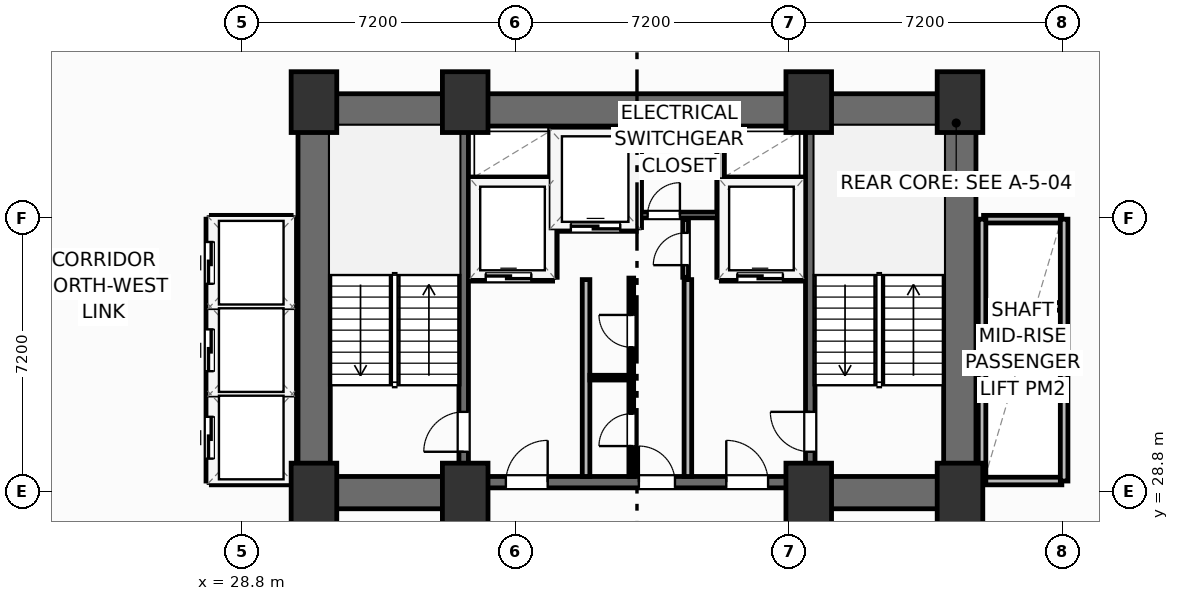
"""IFC4 building model, lengths in metres.
Left out: names, types, materials, properties, quantities, classifications, styles, units other than length and angle.
Written with IfcOpenShell. Run it as: python <this file> out.ifc"""

import sys

from ifc_helpers import new_model, si_unit, direction, frame, frame_2d, origin, origin_2d, place, context, subcontext, project, spatial, rectangle, extrude, element, fill, save


model = new_model("IFC4")
c1 = context("Model", 3, precision=1e-05, world=origin(), true_north=direction((0.0, 1.0)))
c2 = subcontext(c1, "Body", "Model", "MODEL_VIEW")
j1 = project(units=[si_unit("LENGTHUNIT", "METRE"), si_unit("PLANEANGLEUNIT", "RADIAN")], contexts=[c1])
p1 = place(None, origin())
s1 = spatial("IfcSite", under=j1, at=p1, CompositionType="ELEMENT")
p2 = place(p1, origin())
s2 = spatial("IfcBuilding", under=s1, at=p2, CompositionType="ELEMENT")
p3 = place(p2, frame((0.0, 0.0, 34.4)))
s3 = spatial("IfcBuildingStorey", under=s2, at=p3, CompositionType="ELEMENT", Elevation=34.4)
for number, where, z_axis, x_axis in (
    (1, (30.7, 28.75, 0.0), (0.0, 0.0, 1.0), (1.0, 0.0, 0.0)),
    (2, (34.68, 28.75, 0.0), (0.0, 0.0, 1.0), (1.0, 0.0, 0.0)),
    (3, (43.72, 28.75, 0.0), (0.0, 0.0, 1.0), (1.0, 0.0, 0.0)),
    (4, (47.7, 28.75, 0.0), (0.0, 0.0, 1.0), (1.0, 0.0, 0.0)),
    (5, (30.7, 39.05, 0.0), (0.0, 0.0, 1.0), (1.0, 0.0, 0.0)),
    (6, (34.68, 39.05, 0.0), (0.0, 0.0, 1.0), (1.0, 0.0, 0.0)),
    (7, (43.72, 39.05, 0.0), (0.0, 0.0, 1.0), (1.0, 0.0, 0.0)),
    (8, (47.7, 39.05, 0.0), (0.0, 0.0, 1.0), (1.0, 0.0, 0.0)),
):
    element("IfcColumn", number, at=place(p3, frame(where, z_axis=z_axis, x_axis=x_axis)), inside=s3, PredefinedType="COLUMN", context=c2, shape_type="SweptSolid", body=[
        extrude(rectangle(XDim=1.2, YDim=1.6, at=origin_2d()), origin(), (0.0, 0.0, 1.0), 3.7),
    ])
p4 = place(p3, frame((30.28, 38.845, 0.0), z_axis=(0.0, 0.0, 1.0), x_axis=(1.0, 0.0, 0.0)))
e9 = element("IfcWall", 9, at=p4, inside=s3, PredefinedType="SHEAR", context=c2, shape_type="SweptSolid", body=[
    extrude(rectangle(XDim=17.84, YDim=0.85, at=frame_2d((8.92, 0.0))), origin(), (0.0, 0.0, 1.0), 3.45),
])
for number, where, z_axis, x_axis in (
    (10, (30.705, 29.2, 0.0), (0.0, 0.0, 1.0), (0.0, 1.0, 0.0)),
    (11, (47.695, 29.2, 0.0), (0.0, 0.0, 1.0), (0.0, 1.0, 0.0)),
):
    element("IfcWall", number, at=place(p3, frame(where, z_axis=z_axis, x_axis=x_axis)), inside=s3, PredefinedType="SHEAR", context=c2, shape_type="SweptSolid", body=[
        extrude(rectangle(XDim=9.22, YDim=0.85, at=frame_2d((4.61, 0.0))), origin(), (0.0, 0.0, 1.0), 3.45),
    ])
for number, where, z_axis, x_axis in (
    (12, (30.28, 28.775, 0.0), (0.0, 0.0, 1.0), (1.0, 0.0, 0.0)),
    (13, (43.6, 28.775, 0.0), (0.0, 0.0, 1.0), (1.0, 0.0, 0.0)),
):
    element("IfcWall", number, at=place(p3, frame(where, z_axis=z_axis, x_axis=x_axis)), inside=s3, PredefinedType="SHEAR", context=c2, shape_type="SweptSolid", body=[
        extrude(rectangle(XDim=4.52, YDim=0.85, at=frame_2d((2.26, 0.0))), origin(), (0.0, 0.0, 1.0), 3.45),
    ])
p5 = place(p3, frame((34.8, 29.05, 0.0), z_axis=(0.0, 0.0, 1.0), x_axis=(1.0, 0.0, 0.0)))
e14 = element("IfcWall", 14, at=p5, inside=s3, PredefinedType="SHEAR", context=c2, shape_type="SweptSolid", body=[
    extrude(rectangle(XDim=8.8, YDim=0.3, at=frame_2d((4.4, 0.0))), origin(), (0.0, 0.0, 1.0), 3.45),
])
p6 = place(p5, frame((0.95, 0.0, 0.0)))
e15 = element("IfcOpeningElement", 15, at=p6, cuts=e14, PredefinedType="OPENING", context=c2, shape_type="SweptSolid", body=[
    extrude(rectangle(XDim=1.1, YDim=2.15, at=frame_2d((0.55, 1.075))), frame((0.0, 0.16, 0.0), z_axis=(0.0, -1.0, 0.0), x_axis=(1.0, 0.0, 0.0)), (0.0, 0.0, 1.0), 0.32),
])
p7 = place(p5, frame((6.75, 0.0, 0.0)))
e16 = element("IfcOpeningElement", 16, at=p7, cuts=e14, PredefinedType="OPENING", context=c2, shape_type="SweptSolid", body=[
    extrude(rectangle(XDim=1.1, YDim=2.15, at=frame_2d((0.55, 1.075))), frame((0.0, 0.16, 0.0), z_axis=(0.0, -1.0, 0.0), x_axis=(1.0, 0.0, 0.0)), (0.0, 0.0, 1.0), 0.32),
])
p8 = place(p5, frame((4.45, 0.0, 0.0)))
e17 = element("IfcOpeningElement", 17, at=p8, cuts=e14, PredefinedType="OPENING", context=c2, shape_type="SweptSolid", body=[
    extrude(rectangle(XDim=0.95, YDim=2.15, at=frame_2d((0.475, 1.075))), frame((0.0, 0.16, 0.0), z_axis=(0.0, -1.0, 0.0), x_axis=(1.0, 0.0, 0.0)), (0.0, 0.0, 1.0), 0.32),
])
p9 = place(p3, frame((34.64, 29.2, 0.0), z_axis=(0.0, 0.0, 1.0), x_axis=(0.0, 1.0, 0.0)))
e18 = element("IfcWall", 18, at=p9, inside=s3, PredefinedType="SHEAR", context=c2, shape_type="SweptSolid", body=[
    extrude(rectangle(XDim=9.22, YDim=0.25, at=frame_2d((4.61, 0.0))), origin(), (0.0, 0.0, 1.0), 3.45),
])
p10 = place(p9, frame((0.65, 0.0, 0.0)))
e19 = element("IfcOpeningElement", 19, at=p10, cuts=e18, PredefinedType="OPENING", context=c2, shape_type="SweptSolid", body=[
    extrude(rectangle(XDim=1.05, YDim=2.15, at=frame_2d((0.525, 1.075))), frame((0.0, 0.135, 0.0), z_axis=(0.0, -1.0, 0.0), x_axis=(1.0, 0.0, 0.0)), (0.0, 0.0, 1.0), 0.27),
])
p11 = place(p3, frame((43.76, 29.2, 0.0), z_axis=(0.0, 0.0, 1.0), x_axis=(0.0, 1.0, 0.0)))
e20 = element("IfcWall", 20, at=p11, inside=s3, PredefinedType="SHEAR", context=c2, shape_type="SweptSolid", body=[
    extrude(rectangle(XDim=9.22, YDim=0.25, at=frame_2d((4.61, 0.0))), origin(), (0.0, 0.0, 1.0), 3.45),
])
p12 = place(p11, frame((0.65, 0.0, 0.0)))
e21 = element("IfcOpeningElement", 21, at=p12, cuts=e20, PredefinedType="OPENING", context=c2, shape_type="SweptSolid", body=[
    extrude(rectangle(XDim=1.05, YDim=2.15, at=frame_2d((0.525, 1.075))), frame((0.0, 0.135, 0.0), z_axis=(0.0, -1.0, 0.0), x_axis=(1.0, 0.0, 0.0)), (0.0, 0.0, 1.0), 0.27),
])
for number, where, z_axis, x_axis in (
    (22, (37.86, 29.2, 0.0), (0.0, 0.0, 1.0), (0.0, 1.0, 0.0)),
    (23, (40.54, 29.2, 0.0), (0.0, 0.0, 1.0), (0.0, 1.0, 0.0)),
):
    element("IfcWall", number, at=place(p3, frame(where, z_axis=z_axis, x_axis=x_axis)), inside=s3, PredefinedType="PARTITIONING", context=c2, shape_type="SweptSolid", body=[
        extrude(rectangle(XDim=5.18, YDim=0.2, at=frame_2d((2.59, 0.0))), origin(), (0.0, 0.0, 1.0), 3.45),
    ])
p13 = place(p3, frame((34.8, 34.44, 0.0), z_axis=(0.0, 0.0, 1.0), x_axis=(1.0, 0.0, 0.0)))
e24 = element("IfcWall", 24, at=p13, inside=s3, PredefinedType="PARTITIONING", context=c2, shape_type="SweptSolid", body=[
    extrude(rectangle(XDim=2.18, YDim=0.2, at=frame_2d((1.09, 0.0))), origin(), (0.0, 0.0, 1.0), 3.45),
])
p14 = place(p13, frame((0.42, 0.0, 0.0)))
e25 = element("IfcOpeningElement", 25, at=p14, cuts=e24, PredefinedType="OPENING", context=c2, shape_type="SweptSolid", body=[
    extrude(rectangle(XDim=1.2, YDim=2.2, at=frame_2d((0.6, 1.1))), frame((0.0, 0.11, 0.0), z_axis=(0.0, -1.0, 0.0), x_axis=(1.0, 0.0, 0.0)), (0.0, 0.0, 1.0), 0.22),
])
p15 = place(p3, frame((34.8, 36.98, 0.0), z_axis=(0.0, 0.0, 1.0), x_axis=(1.0, 0.0, 0.0)))
e26 = element("IfcWall", 26, at=p15, inside=s3, PredefinedType="PARTITIONING", context=c2, shape_type="SweptSolid", body=[
    extrude(rectangle(XDim=2.18, YDim=0.2, at=frame_2d((1.09, 0.0))), origin(), (0.0, 0.0, 1.0), 3.45),
])
p16 = place(p3, frame((37.0, 34.44, 0.0), z_axis=(0.0, 0.0, 1.0), x_axis=(0.0, 1.0, 0.0)))
e27 = element("IfcWall", 27, at=p16, inside=s3, PredefinedType="PARTITIONING", context=c2, shape_type="SweptSolid", body=[
    extrude(rectangle(XDim=3.9, YDim=0.2, at=frame_2d((1.95, 0.0))), origin(), (0.0, 0.0, 1.0), 3.45),
])
p17 = place(p3, frame((41.42, 34.44, 0.0), z_axis=(0.0, 0.0, 1.0), x_axis=(1.0, 0.0, 0.0)))
e28 = element("IfcWall", 28, at=p17, inside=s3, PredefinedType="PARTITIONING", context=c2, shape_type="SweptSolid", body=[
    extrude(rectangle(XDim=2.18, YDim=0.2, at=frame_2d((1.09, 0.0))), origin(), (0.0, 0.0, 1.0), 3.45),
])
p18 = place(p17, frame((0.42, 0.0, 0.0)))
e29 = element("IfcOpeningElement", 29, at=p18, cuts=e28, PredefinedType="OPENING", context=c2, shape_type="SweptSolid", body=[
    extrude(rectangle(XDim=1.2, YDim=2.2, at=frame_2d((0.6, 1.1))), frame((0.0, 0.11, 0.0), z_axis=(0.0, -1.0, 0.0), x_axis=(1.0, 0.0, 0.0)), (0.0, 0.0, 1.0), 0.22),
])
p19 = place(p3, frame((41.42, 36.98, 0.0), z_axis=(0.0, 0.0, 1.0), x_axis=(1.0, 0.0, 0.0)))
e30 = element("IfcWall", 30, at=p19, inside=s3, PredefinedType="PARTITIONING", context=c2, shape_type="SweptSolid", body=[
    extrude(rectangle(XDim=2.18, YDim=0.2, at=frame_2d((1.09, 0.0))), origin(), (0.0, 0.0, 1.0), 3.45),
])
p20 = place(p3, frame((41.4, 34.44, 0.0), z_axis=(0.0, 0.0, 1.0), x_axis=(0.0, 1.0, 0.0)))
e31 = element("IfcWall", 31, at=p20, inside=s3, PredefinedType="PARTITIONING", context=c2, shape_type="SweptSolid", body=[
    extrude(rectangle(XDim=3.9, YDim=0.2, at=frame_2d((1.95, 0.0))), origin(), (0.0, 0.0, 1.0), 3.45),
])
p21 = place(p3, frame((37.06, 35.75, 0.0), z_axis=(0.0, 0.0, 1.0), x_axis=(1.0, 0.0, 0.0)))
e32 = element("IfcWall", 32, at=p21, inside=s3, PredefinedType="PARTITIONING", context=c2, shape_type="SweptSolid", body=[
    extrude(rectangle(XDim=2.12, YDim=0.2, at=frame_2d((1.06, 0.0))), origin(), (0.0, 0.0, 1.0), 3.45),
])
p22 = place(p21, frame((0.4, 0.0, 0.0)))
e33 = element("IfcOpeningElement", 33, at=p22, cuts=e32, PredefinedType="OPENING", context=c2, shape_type="SweptSolid", body=[
    extrude(rectangle(XDim=1.3, YDim=2.2, at=frame_2d((0.65, 1.1))), frame((0.0, 0.11, 0.0), z_axis=(0.0, -1.0, 0.0), x_axis=(1.0, 0.0, 0.0)), (0.0, 0.0, 1.0), 0.22),
])
p23 = place(p3, frame((39.22, 35.75, 0.0), z_axis=(0.0, 0.0, 1.0), x_axis=(0.0, 1.0, 0.0)))
e34 = element("IfcWall", 34, at=p23, inside=s3, PredefinedType="PARTITIONING", context=c2, shape_type="SweptSolid", body=[
    extrude(rectangle(XDim=2.59, YDim=0.2, at=frame_2d((1.295, 0.0))), origin(), (0.0, 0.0, 1.0), 3.45),
])
p24 = place(p3, frame((39.3, 36.08, 0.0), z_axis=(0.0, 0.0, 1.0), x_axis=(1.0, 0.0, 0.0)))
e35 = element("IfcWall", 35, at=p24, inside=s3, PredefinedType="PARTITIONING", context=c2, shape_type="SweptSolid", body=[
    extrude(rectangle(XDim=2.02, YDim=0.15, at=frame_2d((1.01, 0.0))), origin(), (0.0, 0.0, 1.0), 3.45),
])
p25 = place(p24, frame((0.18, 0.0, 0.0)))
e36 = element("IfcOpeningElement", 36, at=p25, cuts=e35, PredefinedType="OPENING", context=c2, shape_type="SweptSolid", body=[
    extrude(rectangle(XDim=0.85, YDim=2.05, at=frame_2d((0.425, 1.025))), frame((0.0, 0.085, 0.0), z_axis=(0.0, -1.0, 0.0), x_axis=(1.0, 0.0, 0.0)), (0.0, 0.0, 1.0), 0.17),
])
p26 = place(p3, frame((40.48, 34.44, 0.0), z_axis=(0.0, 0.0, 1.0), x_axis=(0.0, 1.0, 0.0)))
e37 = element("IfcWall", 37, at=p26, inside=s3, PredefinedType="PARTITIONING", context=c2, shape_type="SweptSolid", body=[
    extrude(rectangle(XDim=1.52, YDim=0.15, at=frame_2d((0.76, 0.0))), origin(), (0.0, 0.0, 1.0), 3.45),
])
p27 = place(p26, frame((0.32, 0.0, 0.0)))
e38 = element("IfcOpeningElement", 38, at=p27, cuts=e37, PredefinedType="OPENING", context=c2, shape_type="SweptSolid", body=[
    extrude(rectangle(XDim=0.85, YDim=2.05, at=frame_2d((0.425, 1.025))), frame((0.0, 0.085, 0.0), z_axis=(0.0, -1.0, 0.0), x_axis=(1.0, 0.0, 0.0)), (0.0, 0.0, 1.0), 0.17),
])
p28 = place(p3, frame((37.96, 31.8, 0.0), z_axis=(0.0, 0.0, 1.0), x_axis=(1.0, 0.0, 0.0)))
e39 = element("IfcWall", 39, at=p28, inside=s3, PredefinedType="PARTITIONING", context=c2, shape_type="SweptSolid", body=[
    extrude(rectangle(XDim=1.09, YDim=0.125, at=frame_2d((0.545, 0.0))), origin(), (0.0, 0.0, 1.0), 3.45),
])
p29 = place(p3, frame((39.05, 29.2, 0.0), z_axis=(0.0, 0.0, 1.0), x_axis=(0.0, 1.0, 0.0)))
e40 = element("IfcWall", 40, at=p29, inside=s3, PredefinedType="PARTITIONING", context=c2, shape_type="SweptSolid", body=[
    extrude(rectangle(XDim=5.22, YDim=0.125, at=frame_2d((2.61, 0.0))), origin(), (0.0, 0.0, 1.0), 3.45),
])
p30 = place(p29, frame((0.8, 0.0, 0.0)))
e41 = element("IfcOpeningElement", 41, at=p30, cuts=e40, PredefinedType="OPENING", context=c2, shape_type="SweptSolid", body=[
    extrude(rectangle(XDim=0.85, YDim=2.05, at=frame_2d((0.425, 1.025))), frame((0.0, 0.073, 0.0), z_axis=(0.0, -1.0, 0.0), x_axis=(1.0, 0.0, 0.0)), (0.0, 0.0, 1.0), 0.145),
])
p31 = place(p29, frame((3.4, 0.0, 0.0)))
e42 = element("IfcOpeningElement", 42, at=p31, cuts=e40, PredefinedType="OPENING", context=c2, shape_type="SweptSolid", body=[
    extrude(rectangle(XDim=0.85, YDim=2.05, at=frame_2d((0.425, 1.025))), frame((0.0, 0.073, 0.0), z_axis=(0.0, -1.0, 0.0), x_axis=(1.0, 0.0, 0.0)), (0.0, 0.0, 1.0), 0.145),
])
for number, where, z_axis, x_axis in (
    (43, (28.02, 31.375, 0.0), (0.0, 0.0, 1.0), (1.0, 0.0, 0.0)),
    (44, (28.02, 33.675, 0.0), (0.0, 0.0, 1.0), (1.0, 0.0, 0.0)),
):
    element("IfcWall", number, at=place(p3, frame(where, z_axis=z_axis, x_axis=x_axis)), inside=s3, PredefinedType="PARTITIONING", context=c2, shape_type="SweptSolid", body=[
        extrude(rectangle(XDim=2.06, YDim=0.2, at=frame_2d((1.03, 0.0))), origin(), (0.0, 0.0, 1.0), 3.45),
    ])
for number, where, z_axis, x_axis in (
    (45, (28.0, 29.08, 0.0), (0.0, 0.0, 1.0), (1.0, 0.0, 0.0)),
    (46, (28.0, 35.97, 0.0), (0.0, 0.0, 1.0), (1.0, 0.0, 0.0)),
):
    element("IfcWall", number, at=place(p3, frame(where, z_axis=z_axis, x_axis=x_axis)), inside=s3, PredefinedType="PARTITIONING", context=c2, shape_type="SweptSolid", body=[
        extrude(rectangle(XDim=2.1, YDim=0.2, at=frame_2d((1.05, 0.0))), origin(), (0.0, 0.0, 1.0), 3.45),
    ])
p32 = place(p3, frame((30.12, 29.08, 0.0), z_axis=(0.0, 0.0, 1.0), x_axis=(0.0, 1.0, 0.0)))
e47 = element("IfcWall", 47, at=p32, inside=s3, PredefinedType="PARTITIONING", context=c2, shape_type="SweptSolid", body=[
    extrude(rectangle(XDim=6.89, YDim=0.2, at=frame_2d((3.445, 0.0))), origin(), (0.0, 0.0, 1.0), 3.45),
])
p33 = place(p3, frame((27.96, 29.08, 0.0), z_axis=(0.0, 0.0, 1.0), x_axis=(0.0, 1.0, 0.0)))
e48 = element("IfcWall", 48, at=p33, inside=s3, PredefinedType="PARTITIONING", context=c2, shape_type="SweptSolid", body=[
    extrude(rectangle(XDim=6.89, YDim=0.2, at=frame_2d((3.445, 0.0))), origin(), (0.0, 0.0, 1.0), 3.45),
])
p34 = place(p33, frame((0.59, 0.0, 0.0)))
e49 = element("IfcOpeningElement", 49, at=p34, cuts=e48, PredefinedType="OPENING", context=c2, shape_type="SweptSolid", body=[
    extrude(rectangle(XDim=1.1, YDim=2.15, at=frame_2d((0.55, 1.075))), frame((0.0, 0.11, 0.0), z_axis=(0.0, -1.0, 0.0), x_axis=(1.0, 0.0, 0.0)), (0.0, 0.0, 1.0), 0.22),
])
p35 = place(p33, frame((2.89, 0.0, 0.0)))
e50 = element("IfcOpeningElement", 50, at=p35, cuts=e48, PredefinedType="OPENING", context=c2, shape_type="SweptSolid", body=[
    extrude(rectangle(XDim=1.1, YDim=2.15, at=frame_2d((0.55, 1.075))), frame((0.0, 0.11, 0.0), z_axis=(0.0, -1.0, 0.0), x_axis=(1.0, 0.0, 0.0)), (0.0, 0.0, 1.0), 0.22),
])
p36 = place(p33, frame((5.19, 0.0, 0.0)))
e51 = element("IfcOpeningElement", 51, at=p36, cuts=e48, PredefinedType="OPENING", context=c2, shape_type="SweptSolid", body=[
    extrude(rectangle(XDim=1.1, YDim=2.15, at=frame_2d((0.55, 1.075))), frame((0.0, 0.11, 0.0), z_axis=(0.0, -1.0, 0.0), x_axis=(1.0, 0.0, 0.0)), (0.0, 0.0, 1.0), 0.22),
])
for number, where, z_axis, x_axis in (
    (52, (48.32, 31.375, 0.0), (0.0, 0.0, 1.0), (1.0, 0.0, 0.0)),
    (53, (48.32, 33.675, 0.0), (0.0, 0.0, 1.0), (1.0, 0.0, 0.0)),
):
    element("IfcWall", number, at=place(p3, frame(where, z_axis=z_axis, x_axis=x_axis)), inside=s3, PredefinedType="PARTITIONING", context=c2, shape_type="SweptSolid", body=[
        extrude(rectangle(XDim=2.06, YDim=0.2, at=frame_2d((1.03, 0.0))), origin(), (0.0, 0.0, 1.0), 3.45),
    ])
p37 = place(p3, frame((48.32, 29.08, 0.0), z_axis=(0.0, 0.0, 1.0), x_axis=(1.0, 0.0, 0.0)))
e54 = element("IfcWall", 54, at=p37, inside=s3, PredefinedType="PARTITIONING", context=c2, shape_type="SweptSolid", body=[
    extrude(rectangle(XDim=2.06, YDim=0.2, at=frame_2d((1.03, 0.0))), origin(), (0.0, 0.0, 1.0), 2.662),
])
p38 = place(p3, frame((48.32, 35.97, 0.0), z_axis=(0.0, 0.0, 1.0), x_axis=(1.0, 0.0, 0.0)))
e55 = element("IfcWall", 55, at=p38, inside=s3, PredefinedType="PARTITIONING", context=c2, shape_type="SweptSolid", body=[
    extrude(rectangle(XDim=2.06, YDim=0.2, at=frame_2d((1.03, 0.0))), origin(), (0.0, 0.0, 1.0), 3.45),
])
for number, where, z_axis, x_axis in (
    (56, (48.28, 29.08, 0.0), (0.0, 0.0, 1.0), (0.0, 1.0, 0.0)),
    (57, (50.44, 29.08, 0.0), (0.0, 0.0, 1.0), (0.0, 1.0, 0.0)),
):
    element("IfcWall", number, at=place(p3, frame(where, z_axis=z_axis, x_axis=x_axis)), inside=s3, PredefinedType="PARTITIONING", context=c2, shape_type="SweptSolid", body=[
        extrude(rectangle(XDim=6.89, YDim=0.2, at=frame_2d((3.445, 0.0))), origin(), (0.0, 0.0, 1.0), 3.45),
    ])
p39 = place(p10, origin())
e58 = element("IfcDoor", 58, at=p39, inside=s3, OperationType="SINGLE_SWING_LEFT", PredefinedType="DOOR", context=c2, shape_type="SweptSolid", body=[
    extrude(rectangle(XDim=1.05, YDim=2.15, at=frame_2d((0.525, 1.075))), frame((0.0, 0.025, 0.0), z_axis=(0.0, -1.0, 0.0), x_axis=(1.0, 0.0, 0.0)), (0.0, 0.0, 1.0), 0.05),
])
fill(e19, e58)
p40 = place(p12, origin())
e59 = element("IfcDoor", 59, at=p40, inside=s3, OperationType="SINGLE_SWING_RIGHT", PredefinedType="DOOR", context=c2, shape_type="SweptSolid", body=[
    extrude(rectangle(XDim=1.05, YDim=2.15, at=frame_2d((0.525, 1.075))), frame((0.0, 0.025, 0.0), z_axis=(0.0, -1.0, 0.0), x_axis=(1.0, 0.0, 0.0)), (0.0, 0.0, 1.0), 0.05),
])
fill(e21, e59)
p41 = place(p6, origin())
e60 = element("IfcDoor", 60, at=p41, inside=s3, OperationType="SINGLE_SWING_RIGHT", PredefinedType="DOOR", context=c2, shape_type="SweptSolid", body=[
    extrude(rectangle(XDim=1.1, YDim=2.15, at=frame_2d((0.55, 1.075))), frame((0.0, 0.025, 0.0), z_axis=(0.0, -1.0, 0.0), x_axis=(1.0, 0.0, 0.0)), (0.0, 0.0, 1.0), 0.05),
])
fill(e15, e60)
p42 = place(p7, origin())
e61 = element("IfcDoor", 61, at=p42, inside=s3, OperationType="SINGLE_SWING_LEFT", PredefinedType="DOOR", context=c2, shape_type="SweptSolid", body=[
    extrude(rectangle(XDim=1.1, YDim=2.15, at=frame_2d((0.55, 1.075))), frame((0.0, 0.025, 0.0), z_axis=(0.0, -1.0, 0.0), x_axis=(1.0, 0.0, 0.0)), (0.0, 0.0, 1.0), 0.05),
])
fill(e16, e61)
p43 = place(p14, origin())
e62 = element("IfcDoor", 62, at=p43, inside=s3, OperationType="SLIDING_TO_LEFT", PredefinedType="DOOR", context=c2, shape_type="SweptSolid", body=[
    extrude(rectangle(XDim=1.2, YDim=2.2, at=frame_2d((0.6, 1.1))), frame((0.0, 0.025, 0.0), z_axis=(0.0, -1.0, 0.0), x_axis=(1.0, 0.0, 0.0)), (0.0, 0.0, 1.0), 0.05),
])
fill(e25, e62)
p44 = place(p18, origin())
e63 = element("IfcDoor", 63, at=p44, inside=s3, OperationType="SLIDING_TO_LEFT", PredefinedType="DOOR", context=c2, shape_type="SweptSolid", body=[
    extrude(rectangle(XDim=1.2, YDim=2.2, at=frame_2d((0.6, 1.1))), frame((0.0, 0.025, 0.0), z_axis=(0.0, -1.0, 0.0), x_axis=(1.0, 0.0, 0.0)), (0.0, 0.0, 1.0), 0.05),
])
fill(e29, e63)
p45 = place(p22, origin())
e64 = element("IfcDoor", 64, at=p45, inside=s3, OperationType="SLIDING_TO_LEFT", PredefinedType="DOOR", context=c2, shape_type="SweptSolid", body=[
    extrude(rectangle(XDim=1.3, YDim=2.2, at=frame_2d((0.65, 1.1))), frame((0.0, 0.025, 0.0), z_axis=(0.0, -1.0, 0.0), x_axis=(1.0, 0.0, 0.0)), (0.0, 0.0, 1.0), 0.05),
])
fill(e33, e64)
p46 = place(p25, origin())
e65 = element("IfcDoor", 65, at=p46, inside=s3, OperationType="SINGLE_SWING_RIGHT", PredefinedType="DOOR", context=c2, shape_type="SweptSolid", body=[
    extrude(rectangle(XDim=0.85, YDim=2.05, at=frame_2d((0.425, 1.025))), frame((0.0, 0.025, 0.0), z_axis=(0.0, -1.0, 0.0), x_axis=(1.0, 0.0, 0.0)), (0.0, 0.0, 1.0), 0.05),
])
fill(e36, e65)
p47 = place(p27, origin())
e66 = element("IfcDoor", 66, at=p47, inside=s3, OperationType="SINGLE_SWING_LEFT", PredefinedType="DOOR", context=c2, shape_type="SweptSolid", body=[
    extrude(rectangle(XDim=0.85, YDim=2.05, at=frame_2d((0.425, 1.025))), frame((0.0, 0.025, 0.0), z_axis=(0.0, -1.0, 0.0), x_axis=(1.0, 0.0, 0.0)), (0.0, 0.0, 1.0), 0.05),
])
fill(e38, e66)
p48 = place(p30, origin())
e67 = element("IfcDoor", 67, at=p48, inside=s3, OperationType="SINGLE_SWING_LEFT", PredefinedType="DOOR", context=c2, shape_type="SweptSolid", body=[
    extrude(rectangle(XDim=0.85, YDim=2.05, at=frame_2d((0.425, 1.025))), frame((0.0, 0.025, 0.0), z_axis=(0.0, -1.0, 0.0), x_axis=(1.0, 0.0, 0.0)), (0.0, 0.0, 1.0), 0.05),
])
fill(e41, e67)
p49 = place(p31, origin())
e68 = element("IfcDoor", 68, at=p49, inside=s3, OperationType="SINGLE_SWING_RIGHT", PredefinedType="DOOR", context=c2, shape_type="SweptSolid", body=[
    extrude(rectangle(XDim=0.85, YDim=2.05, at=frame_2d((0.425, 1.025))), frame((0.0, 0.025, 0.0), z_axis=(0.0, -1.0, 0.0), x_axis=(1.0, 0.0, 0.0)), (0.0, 0.0, 1.0), 0.05),
])
fill(e42, e68)
p50 = place(p8, origin())
e69 = element("IfcDoor", 69, at=p50, inside=s3, OperationType="SINGLE_SWING_LEFT", PredefinedType="DOOR", context=c2, shape_type="SweptSolid", body=[
    extrude(rectangle(XDim=0.95, YDim=2.15, at=frame_2d((0.475, 1.075))), frame((0.0, 0.025, 0.0), z_axis=(0.0, -1.0, 0.0), x_axis=(1.0, 0.0, 0.0)), (0.0, 0.0, 1.0), 0.05),
])
fill(e17, e69)
p51 = place(p34, origin())
e70 = element("IfcDoor", 70, at=p51, inside=s3, OperationType="SLIDING_TO_LEFT", PredefinedType="DOOR", context=c2, shape_type="SweptSolid", body=[
    extrude(rectangle(XDim=1.1, YDim=2.15, at=frame_2d((0.55, 1.075))), frame((0.0, 0.025, 0.0), z_axis=(0.0, -1.0, 0.0), x_axis=(1.0, 0.0, 0.0)), (0.0, 0.0, 1.0), 0.05),
])
fill(e49, e70)
p52 = place(p35, origin())
e71 = element("IfcDoor", 71, at=p52, inside=s3, OperationType="SLIDING_TO_LEFT", PredefinedType="DOOR", context=c2, shape_type="SweptSolid", body=[
    extrude(rectangle(XDim=1.1, YDim=2.15, at=frame_2d((0.55, 1.075))), frame((0.0, 0.025, 0.0), z_axis=(0.0, -1.0, 0.0), x_axis=(1.0, 0.0, 0.0)), (0.0, 0.0, 1.0), 0.05),
])
fill(e50, e71)
p53 = place(p36, origin())
e72 = element("IfcDoor", 72, at=p53, inside=s3, OperationType="SLIDING_TO_LEFT", PredefinedType="DOOR", context=c2, shape_type="SweptSolid", body=[
    extrude(rectangle(XDim=1.1, YDim=2.15, at=frame_2d((0.55, 1.075))), frame((0.0, 0.025, 0.0), z_axis=(0.0, -1.0, 0.0), x_axis=(1.0, 0.0, 0.0)), (0.0, 0.0, 1.0), 0.05),
])
fill(e51, e72)
save(model, sys.argv[1])
